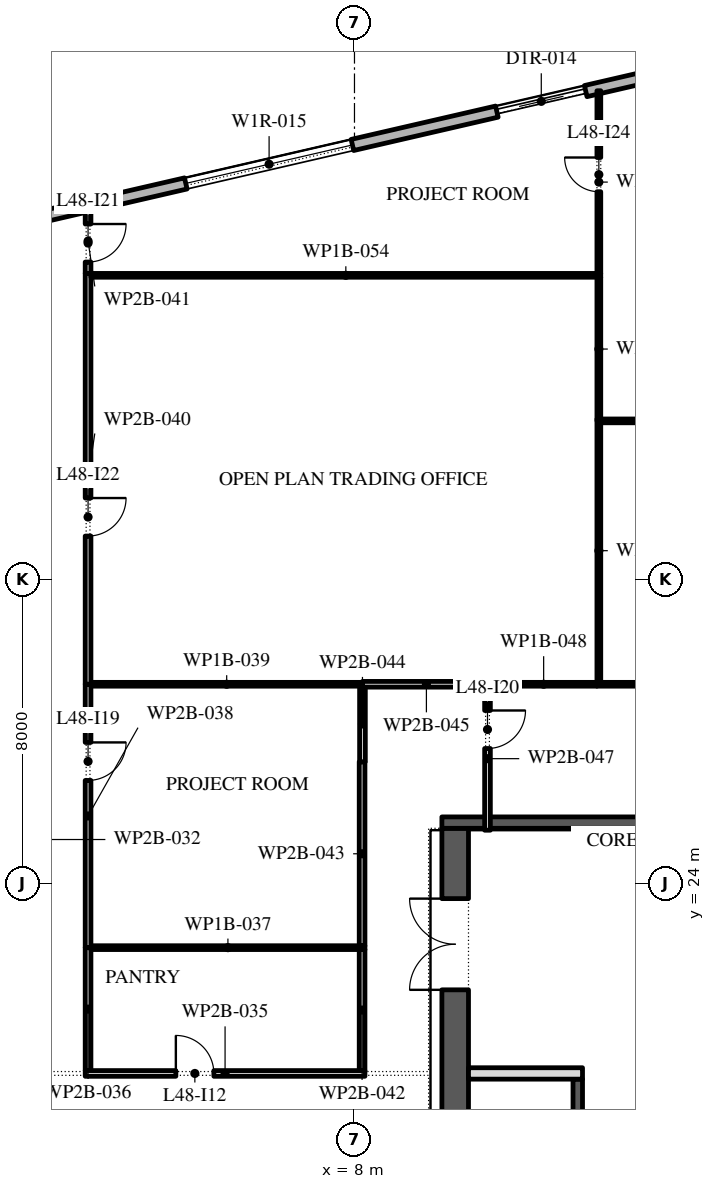
"""IFC4 building model, lengths in metres.
Left out: names, types, materials, properties, quantities, classifications, styles, units other than length and angle.
Written with IfcOpenShell. Run it as: python <this file> out.ifc"""

import sys

from ifc_helpers import new_model, si_unit, direction, frame, frame_2d, origin, place, context, subcontext, project, spatial, rectangle, extrude, element, fill, save


model = new_model("IFC4")
c1 = context("Model", 3, precision=1e-05, world=origin(), true_north=direction((0.0, 1.0)))
c2 = subcontext(c1, "Body", "Model", "MODEL_VIEW")
j1 = project(units=[si_unit("LENGTHUNIT", "METRE"), si_unit("PLANEANGLEUNIT", "RADIAN")], contexts=[c1])
p1 = place(None, origin())
s1 = spatial("IfcSite", under=j1, at=p1, CompositionType="ELEMENT")
p2 = place(p1, origin())
s2 = spatial("IfcBuilding", under=s1, at=p2, CompositionType="ELEMENT")
p3 = place(p2, frame((0.0, 0.0, 217.8)))
s3 = spatial("IfcBuildingStorey", under=s2, at=p3, CompositionType="ELEMENT", Elevation=217.8)
p4 = place(p3, frame((17.592, 45.657, 0.0), z_axis=(0.0, 0.0, 1.0), x_axis=(-0.974370243697, -0.224950279389, 0.0)))
e1 = element("IfcWall", 1, at=p4, inside=s3, PredefinedType="STANDARD", context=c2, shape_type="SweptSolid", body=[
    extrude(rectangle(XDim=49.5, YDim=0.3, at=frame_2d((24.75, 0.0))), origin(), (0.0, 0.0, 1.0), 3.95),
])
p5 = place(p4, frame((3.6, 0.0, 0.0)))
e2 = element("IfcOpeningElement", 2, at=p5, cuts=e1, PredefinedType="OPENING", context=c2, shape_type="SweptSolid", body=[
    extrude(rectangle(XDim=2.4, YDim=2.85, at=frame_2d((1.2, 1.425))), frame((0.0, 0.16, 0.0), z_axis=(0.0, -1.0, 0.0), x_axis=(1.0, 0.0, 0.0)), (0.0, 0.0, 1.0), 0.32),
])
p6 = place(p4, frame((9.9, 0.0, 0.45)))
e3 = element("IfcOpeningElement", 3, at=p6, cuts=e1, PredefinedType="OPENING", context=c2, shape_type="SweptSolid", body=[
    extrude(rectangle(XDim=4.5, YDim=2.4, at=frame_2d((2.25, 1.2))), frame((0.0, 0.16, 0.0), z_axis=(0.0, -1.0, 0.0), x_axis=(1.0, 0.0, 0.0)), (0.0, 0.0, 1.0), 0.32),
])
p7 = place(p4, frame((18.2, 0.0, 0.45)))
e4 = element("IfcOpeningElement", 4, at=p7, cuts=e1, PredefinedType="OPENING", context=c2, shape_type="SweptSolid", body=[
    extrude(rectangle(XDim=4.5, YDim=2.4, at=frame_2d((2.25, 1.2))), frame((0.0, 0.16, 0.0), z_axis=(0.0, -1.0, 0.0), x_axis=(1.0, 0.0, 0.0)), (0.0, 0.0, 1.0), 0.32),
])
p8 = place(p4, frame((26.5, 0.0, 0.45)))
e5 = element("IfcOpeningElement", 5, at=p8, cuts=e1, PredefinedType="OPENING", context=c2, shape_type="SweptSolid", body=[
    extrude(rectangle(XDim=4.5, YDim=2.4, at=frame_2d((2.25, 1.2))), frame((0.0, 0.16, 0.0), z_axis=(0.0, -1.0, 0.0), x_axis=(1.0, 0.0, 0.0)), (0.0, 0.0, 1.0), 0.32),
])
p9 = place(p4, frame((35.85, 0.0, 0.0)))
e6 = element("IfcOpeningElement", 6, at=p9, cuts=e1, PredefinedType="OPENING", context=c2, shape_type="SweptSolid", body=[
    extrude(rectangle(XDim=2.4, YDim=3.5, at=frame_2d((1.2, 1.75))), frame((0.0, 0.16, 0.0), z_axis=(0.0, -1.0, 0.0), x_axis=(1.0, 0.0, 0.0)), (0.0, 0.0, 1.0), 0.32),
])
p10 = place(p4, frame((43.1, 0.0, 0.45)))
e7 = element("IfcOpeningElement", 7, at=p10, cuts=e1, PredefinedType="OPENING", context=c2, shape_type="SweptSolid", body=[
    extrude(rectangle(XDim=4.5, YDim=2.525, at=frame_2d((2.25, 1.262))), frame((0.0, 0.16, 0.0), z_axis=(0.0, -1.0, 0.0), x_axis=(1.0, 0.0, 0.0)), (0.0, 0.0, 1.0), 0.32),
])
p11 = place(p3, frame((10.65, -2.45, 0.0), z_axis=(0.0, 0.0, 1.0), x_axis=(0.0, 1.0, 0.0)))
e8 = element("IfcWall", 8, at=p11, inside=s3, PredefinedType="SHEAR", context=c2, shape_type="SweptSolid", body=[
    extrude(rectangle(XDim=27.9, YDim=0.7, at=frame_2d((13.95, 0.0))), origin(), (0.0, 0.0, 1.0), 3.95),
])
p12 = place(p11, frame((23.65, 0.0, 0.0)))
e9 = element("IfcOpeningElement", 9, at=p12, cuts=e8, PredefinedType="OPENING", context=c2, shape_type="SweptSolid", body=[
    extrude(rectangle(XDim=2.4, YDim=2.1, at=frame_2d((1.2, 1.05))), frame((0.0, 0.36, 0.0), z_axis=(0.0, -1.0, 0.0), x_axis=(1.0, 0.0, 0.0)), (0.0, 0.0, 1.0), 0.72),
])
p13 = place(p11, frame((1.087, 0.0, 0.0)))
e10 = element("IfcOpeningElement", 10, at=p13, cuts=e8, PredefinedType="OPENING", context=c2, shape_type="SweptSolid", body=[
    extrude(rectangle(XDim=0.9, YDim=2.1, at=frame_2d((0.45, 1.05))), frame((0.0, 0.36, 0.0), z_axis=(0.0, -1.0, 0.0), x_axis=(1.0, 0.0, 0.0)), (0.0, 0.0, 1.0), 0.72),
])
p14 = place(p11, frame((4.262, 0.0, 0.0)))
e11 = element("IfcOpeningElement", 11, at=p14, cuts=e8, PredefinedType="OPENING", context=c2, shape_type="SweptSolid", body=[
    extrude(rectangle(XDim=1.0, YDim=2.1, at=frame_2d((0.5, 1.05))), frame((0.0, 0.36, 0.0), z_axis=(0.0, -1.0, 0.0), x_axis=(1.0, 0.0, 0.0)), (0.0, 0.0, 1.0), 0.72),
])
p15 = place(p3, frame((10.3, 25.6, 0.0), z_axis=(0.0, 0.0, 1.0), x_axis=(1.0, 0.0, 0.0)))
e12 = element("IfcWall", 12, at=p15, inside=s3, PredefinedType="SHEAR", context=c2, shape_type="SweptSolid", body=[
    extrude(rectangle(XDim=11.4, YDim=0.3, at=frame_2d((5.7, 0.0))), origin(), (0.0, 0.0, 1.0), 3.95),
])
p16 = place(p3, frame((13.875, -2.45, 0.0), z_axis=(0.0, 0.0, 1.0), x_axis=(0.0, 1.0, 0.0)))
e13 = element("IfcWall", 13, at=p16, inside=s3, PredefinedType="SHEAR", context=c2, shape_type="SweptSolid", body=[
    extrude(rectangle(XDim=21.3, YDim=0.25, at=frame_2d((10.65, 0.0))), origin(), (0.0, 0.0, 1.0), 3.95),
])
p17 = place(p16, frame((17.786, 0.0, 0.0)))
e14 = element("IfcOpeningElement", 14, at=p17, cuts=e13, PredefinedType="OPENING", context=c2, shape_type="SweptSolid", body=[
    extrude(rectangle(XDim=0.9, YDim=2.1, at=frame_2d((0.45, 1.05))), frame((0.0, 0.135, 0.0), z_axis=(0.0, -1.0, 0.0), x_axis=(1.0, 0.0, 0.0)), (0.0, 0.0, 1.0), 0.27),
])
p18 = place(p16, frame((6.971, 0.0, 0.0)))
e15 = element("IfcOpeningElement", 15, at=p18, cuts=e13, PredefinedType="OPENING", context=c2, shape_type="SweptSolid", body=[
    extrude(rectangle(XDim=1.1, YDim=2.1, at=frame_2d((0.55, 1.05))), frame((0.0, 0.135, 0.0), z_axis=(0.0, -1.0, 0.0), x_axis=(1.0, 0.0, 0.0)), (0.0, 0.0, 1.0), 0.27),
])
p19 = place(p16, frame((9.114, 0.0, 0.0)))
e16 = element("IfcOpeningElement", 16, at=p19, cuts=e13, PredefinedType="OPENING", context=c2, shape_type="SweptSolid", body=[
    extrude(rectangle(XDim=1.1, YDim=2.1, at=frame_2d((0.55, 1.05))), frame((0.0, 0.135, 0.0), z_axis=(0.0, -1.0, 0.0), x_axis=(1.0, 0.0, 0.0)), (0.0, 0.0, 1.0), 0.27),
])
p20 = place(p16, frame((11.257, 0.0, 0.0)))
e17 = element("IfcOpeningElement", 17, at=p20, cuts=e13, PredefinedType="OPENING", context=c2, shape_type="SweptSolid", body=[
    extrude(rectangle(XDim=1.1, YDim=2.1, at=frame_2d((0.55, 1.05))), frame((0.0, 0.135, 0.0), z_axis=(0.0, -1.0, 0.0), x_axis=(1.0, 0.0, 0.0)), (0.0, 0.0, 1.0), 0.27),
])
p21 = place(p16, frame((13.4, 0.0, 0.0)))
e18 = element("IfcOpeningElement", 18, at=p21, cuts=e13, PredefinedType="OPENING", context=c2, shape_type="SweptSolid", body=[
    extrude(rectangle(XDim=1.1, YDim=2.1, at=frame_2d((0.55, 1.05))), frame((0.0, 0.135, 0.0), z_axis=(0.0, -1.0, 0.0), x_axis=(1.0, 0.0, 0.0)), (0.0, 0.0, 1.0), 0.27),
])
p22 = place(p3, frame((11.0, 19.0, 0.0), z_axis=(0.0, 0.0, 1.0), x_axis=(1.0, 0.0, 0.0)))
e19 = element("IfcWall", 19, at=p22, inside=s3, PredefinedType="PARTITIONING", context=c2, shape_type="SweptSolid", body=[
    extrude(rectangle(XDim=3.0, YDim=0.3, at=frame_2d((1.5, 0.0))), origin(), (0.0, 0.0, 1.0), 3.95),
])
p23 = place(p3, frame((0.915, 19.0, 0.0), z_axis=(0.0, 0.0, 1.0), x_axis=(1.0, 0.0, 0.0)))
e20 = element("IfcWall", 20, at=p23, inside=s3, PredefinedType="PARTITIONING", context=c2, shape_type="SweptSolid", body=[
    extrude(rectangle(XDim=7.36, YDim=0.15, at=frame_2d((3.68, 0.0))), origin(), (0.0, 0.0, 1.0), 3.95),
])
p24 = place(p23, frame((2.385, 0.0, 0.0)))
e21 = element("IfcOpeningElement", 21, at=p24, cuts=e20, PredefinedType="OPENING", context=c2, shape_type="SweptSolid", body=[
    extrude(rectangle(XDim=1.0, YDim=2.1, at=frame_2d((0.5, 1.05))), frame((0.0, 0.085, 0.0), z_axis=(0.0, -1.0, 0.0), x_axis=(1.0, 0.0, 0.0)), (0.0, 0.0, 1.0), 0.17),
])
p25 = place(p3, frame((0.99, 22.31, 0.0), z_axis=(0.0, 0.0, 1.0), x_axis=(0.0, -1.0, 0.0)))
e22 = element("IfcWall", 22, at=p25, inside=s3, PredefinedType="PARTITIONING", context=c2, shape_type="SweptSolid", body=[
    extrude(rectangle(XDim=3.235, YDim=0.15, at=frame_2d((1.618, 0.0))), origin(), (0.0, 0.0, 1.0), 3.95),
])
p26 = place(p3, frame((1.065, 22.31, 0.0), z_axis=(0.0, 0.0, 1.0), x_axis=(1.0, 0.0, 0.0)))
e23 = element("IfcWall", 23, at=p26, inside=s3, PredefinedType="PARTITIONING", context=c2, shape_type="SweptSolid", body=[
    extrude(rectangle(XDim=7.21, YDim=0.1, at=frame_2d((3.605, 0.0))), origin(), (0.0, 0.0, 1.0), 3.95),
])
p27 = place(p3, frame((0.99, 29.24, 0.0), z_axis=(0.0, 0.0, 1.0), x_axis=(0.0, -1.0, 0.0)))
e24 = element("IfcWall", 24, at=p27, inside=s3, PredefinedType="PARTITIONING", context=c2, shape_type="SweptSolid", body=[
    extrude(rectangle(XDim=6.93, YDim=0.15, at=frame_2d((3.465, 0.0))), origin(), (0.0, 0.0, 1.0), 3.95),
])
p28 = place(p27, frame((1.53, 0.0, 0.0)))
e25 = element("IfcOpeningElement", 25, at=p28, cuts=e24, PredefinedType="OPENING", context=c2, shape_type="SweptSolid", body=[
    extrude(rectangle(XDim=1.0, YDim=2.1, at=frame_2d((0.5, 1.05))), frame((0.0, 0.085, 0.0), z_axis=(0.0, -1.0, 0.0), x_axis=(1.0, 0.0, 0.0)), (0.0, 0.0, 1.0), 0.17),
])
p29 = place(p3, frame((1.065, 29.24, 0.0), z_axis=(0.0, 0.0, 1.0), x_axis=(1.0, 0.0, 0.0)))
e26 = element("IfcWall", 26, at=p29, inside=s3, PredefinedType="PARTITIONING", context=c2, shape_type="SweptSolid", body=[
    extrude(rectangle(XDim=7.145, YDim=0.1, at=frame_2d((3.573, 0.0))), origin(), (0.0, 0.0, 1.0), 3.95),
])
p30 = place(p3, frame((0.99, 40.05, 0.0), z_axis=(0.0, 0.0, 1.0), x_axis=(0.0, -1.0, 0.0)))
e27 = element("IfcWall", 27, at=p30, inside=s3, PredefinedType="PARTITIONING", context=c2, shape_type="SweptSolid", body=[
    extrude(rectangle(XDim=10.81, YDim=0.15, at=frame_2d((5.405, 0.0))), origin(), (0.0, 0.0, 1.0), 3.95),
])
p31 = place(p30, frame((5.91, 0.0, 0.0)))
e28 = element("IfcOpeningElement", 28, at=p31, cuts=e27, PredefinedType="OPENING", context=c2, shape_type="SweptSolid", body=[
    extrude(rectangle(XDim=1.0, YDim=2.1, at=frame_2d((0.5, 1.05))), frame((0.0, 0.085, 0.0), z_axis=(0.0, -1.0, 0.0), x_axis=(1.0, 0.0, 0.0)), (0.0, 0.0, 1.0), 0.17),
])
p32 = place(p3, frame((0.99, 41.753, 0.0), z_axis=(0.0, 0.0, 1.0), x_axis=(0.0, -1.0, 0.0)))
e29 = element("IfcWall", 29, at=p32, inside=s3, PredefinedType="PARTITIONING", context=c2, shape_type="SweptSolid", body=[
    extrude(rectangle(XDim=1.703, YDim=0.15, at=frame_2d((0.852, 0.0))), origin(), (0.0, 0.0, 1.0), 3.95),
])
p33 = place(p32, frame((0.403, 0.0, 0.0)))
e30 = element("IfcOpeningElement", 30, at=p33, cuts=e29, PredefinedType="OPENING", context=c2, shape_type="SweptSolid", body=[
    extrude(rectangle(XDim=1.0, YDim=2.1, at=frame_2d((0.5, 1.05))), frame((0.0, 0.085, 0.0), z_axis=(0.0, -1.0, 0.0), x_axis=(1.0, 0.0, 0.0)), (0.0, 0.0, 1.0), 0.17),
])
p34 = place(p3, frame((8.2, 19.075, 0.0), z_axis=(0.0, 0.0, 1.0), x_axis=(0.0, 1.0, 0.0)))
e31 = element("IfcWall", 31, at=p34, inside=s3, PredefinedType="PARTITIONING", context=c2, shape_type="SweptSolid", body=[
    extrude(rectangle(XDim=3.185, YDim=0.15, at=frame_2d((1.593, 0.0))), origin(), (0.0, 0.0, 1.0), 3.95),
])
p35 = place(p3, frame((8.2, 22.36, 0.0), z_axis=(0.0, 0.0, 1.0), x_axis=(0.0, 1.0, 0.0)))
e32 = element("IfcWall", 32, at=p35, inside=s3, PredefinedType="PARTITIONING", context=c2, shape_type="SweptSolid", body=[
    extrude(rectangle(XDim=4.84, YDim=0.15, at=frame_2d((2.42, 0.0))), origin(), (0.0, 0.0, 1.0), 3.95),
])
p36 = place(p3, frame((8.21, 27.2, 0.0), z_axis=(0.0, 0.0, 1.0), x_axis=(0.0, 1.0, 0.0)))
e33 = element("IfcWall", 33, at=p36, inside=s3, PredefinedType="PARTITIONING", context=c2, shape_type="SweptSolid", body=[
    extrude(rectangle(XDim=1.99, YDim=0.15, at=frame_2d((0.995, 0.0))), origin(), (0.0, 0.0, 1.0), 3.95),
])
p37 = place(p3, frame((8.21, 29.24, 0.0), z_axis=(0.0, 0.0, 1.0), x_axis=(1.0, 0.0, 0.0)))
e34 = element("IfcWall", 34, at=p37, inside=s3, PredefinedType="PARTITIONING", context=c2, shape_type="SweptSolid", body=[
    extrude(rectangle(XDim=3.365, YDim=0.15, at=frame_2d((1.683, 0.0))), origin(), (0.0, 0.0, 1.0), 3.95),
])
p38 = place(p3, frame((11.5, 29.165, 0.0), z_axis=(0.0, 0.0, 1.0), x_axis=(0.0, -1.0, 0.0)))
e35 = element("IfcWall", 35, at=p38, inside=s3, PredefinedType="PARTITIONING", context=c2, shape_type="SweptSolid", body=[
    extrude(rectangle(XDim=3.765, YDim=0.15, at=frame_2d((1.883, 0.0))), origin(), (0.0, 0.0, 1.0), 3.95),
])
p39 = place(p38, frame((0.615, 0.0, 0.0)))
e36 = element("IfcOpeningElement", 36, at=p39, cuts=e35, PredefinedType="OPENING", context=c2, shape_type="SweptSolid", body=[
    extrude(rectangle(XDim=1.0, YDim=2.1, at=frame_2d((0.5, 1.05))), frame((0.0, 0.085, 0.0), z_axis=(0.0, -1.0, 0.0), x_axis=(1.0, 0.0, 0.0)), (0.0, 0.0, 1.0), 0.17),
])
p40 = place(p3, frame((11.575, 29.24, 0.0), z_axis=(0.0, 0.0, 1.0), x_axis=(1.0, 0.0, 0.0)))
e37 = element("IfcWall", 37, at=p40, inside=s3, PredefinedType="PARTITIONING", context=c2, shape_type="SweptSolid", body=[
    extrude(rectangle(XDim=2.805, YDim=0.1, at=frame_2d((1.402, 0.0))), origin(), (0.0, 0.0, 1.0), 3.95),
])
p41 = place(p3, frame((14.38, 29.24, 0.0), z_axis=(0.0, 0.0, 1.0), x_axis=(1.0, 0.0, 0.0)))
e38 = element("IfcWall", 38, at=p41, inside=s3, PredefinedType="PARTITIONING", context=c2, shape_type="SweptSolid", body=[
    extrude(rectangle(XDim=7.63, YDim=0.1, at=frame_2d((3.815, 0.0))), origin(), (0.0, 0.0, 1.0), 3.95),
])
p42 = place(p41, frame((3.28, 0.0, 0.0)))
e39 = element("IfcOpeningElement", 39, at=p42, cuts=e38, PredefinedType="OPENING", context=c2, shape_type="SweptSolid", body=[
    extrude(rectangle(XDim=0.9, YDim=2.1, at=frame_2d((0.45, 1.05))), frame((0.0, 0.06, 0.0), z_axis=(0.0, -1.0, 0.0), x_axis=(1.0, 0.0, 0.0)), (0.0, 0.0, 1.0), 0.12),
])
p43 = place(p3, frame((14.43, 36.22, 0.0), z_axis=(0.0, 0.0, 1.0), x_axis=(0.0, -1.0, 0.0)))
e40 = element("IfcWall", 40, at=p43, inside=s3, PredefinedType="PARTITIONING", context=c2, shape_type="SweptSolid", body=[
    extrude(rectangle(XDim=6.93, YDim=0.1, at=frame_2d((3.465, 0.0))), origin(), (0.0, 0.0, 1.0), 3.95),
])
p44 = place(p3, frame((14.48, 36.17, 0.0), z_axis=(0.0, 0.0, 1.0), x_axis=(1.0, 0.0, 0.0)))
e41 = element("IfcWall", 41, at=p44, inside=s3, PredefinedType="PARTITIONING", context=c2, shape_type="SweptSolid", body=[
    extrude(rectangle(XDim=9.08, YDim=0.1, at=frame_2d((4.54, 0.0))), origin(), (0.0, 0.0, 1.0), 3.95),
])
p45 = place(p3, frame((14.48, 40.0, 0.0), z_axis=(0.0, 0.0, 1.0), x_axis=(-1.0, 0.0, 0.0)))
e42 = element("IfcWall", 42, at=p45, inside=s3, PredefinedType="PARTITIONING", context=c2, shape_type="SweptSolid", body=[
    extrude(rectangle(XDim=13.415, YDim=0.1, at=frame_2d((6.708, 0.0))), origin(), (0.0, 0.0, 1.0), 3.95),
])
p46 = place(p3, frame((14.43, 39.95, 0.0), z_axis=(0.0, 0.0, 1.0), x_axis=(0.0, -1.0, 0.0)))
e43 = element("IfcWall", 43, at=p46, inside=s3, PredefinedType="PARTITIONING", context=c2, shape_type="SweptSolid", body=[
    extrude(rectangle(XDim=3.78, YDim=0.1, at=frame_2d((1.89, 0.0))), origin(), (0.0, 0.0, 1.0), 3.95),
])
p47 = place(p3, frame((14.43, 44.856, 0.0), z_axis=(0.0, 0.0, 1.0), x_axis=(0.0, -1.0, 0.0)))
e44 = element("IfcWall", 44, at=p47, inside=s3, PredefinedType="PARTITIONING", context=c2, shape_type="SweptSolid", body=[
    extrude(rectangle(XDim=4.806, YDim=0.1, at=frame_2d((2.403, 0.0))), origin(), (0.0, 0.0, 1.0), 3.95),
])
p48 = place(p47, frame((1.756, 0.0, 0.0)))
e45 = element("IfcOpeningElement", 45, at=p48, cuts=e44, PredefinedType="OPENING", context=c2, shape_type="SweptSolid", body=[
    extrude(rectangle(XDim=0.9, YDim=2.1, at=frame_2d((0.45, 1.05))), frame((0.0, 0.06, 0.0), z_axis=(0.0, -1.0, 0.0), x_axis=(1.0, 0.0, 0.0)), (0.0, 0.0, 1.0), 0.12),
])
p49 = place(p5, origin())
e46 = element("IfcDoor", 46, at=p49, inside=s3, OperationType="DOUBLE_DOOR_SLIDING", PredefinedType="DOOR", context=c2, shape_type="SweptSolid", body=[
    extrude(rectangle(XDim=2.4, YDim=2.85, at=frame_2d((1.2, 1.425))), frame((0.0, 0.025, 0.0), z_axis=(0.0, -1.0, 0.0), x_axis=(1.0, 0.0, 0.0)), (0.0, 0.0, 1.0), 0.05),
])
fill(e2, e46)
p50 = place(p6, origin())
e47 = element("IfcWindow", 47, at=p50, inside=s3, PartitioningType="DOUBLE_PANEL_VERTICAL", PredefinedType="WINDOW", context=c2, shape_type="SweptSolid", body=[
    extrude(rectangle(XDim=4.5, YDim=2.4, at=frame_2d((2.25, 1.2))), frame((0.0, 0.03, 0.0), z_axis=(0.0, -1.0, 0.0), x_axis=(1.0, 0.0, 0.0)), (0.0, 0.0, 1.0), 0.06),
])
fill(e3, e47)
p51 = place(p12, origin())
e48 = element("IfcDoor", 48, at=p51, inside=s3, OperationType="DOUBLE_DOOR_SINGLE_SWING", PredefinedType="DOOR", context=c2, shape_type="SweptSolid", body=[
    extrude(rectangle(XDim=2.4, YDim=2.1, at=frame_2d((1.2, 1.05))), frame((0.0, 0.025, 0.0), z_axis=(0.0, -1.0, 0.0), x_axis=(1.0, 0.0, 0.0)), (0.0, 0.0, 1.0), 0.05),
])
fill(e9, e48)
p52 = place(p24, origin())
e49 = element("IfcDoor", 49, at=p52, inside=s3, OperationType="SINGLE_SWING_RIGHT", PredefinedType="DOOR", context=c2, shape_type="SweptSolid", body=[
    extrude(rectangle(XDim=1.0, YDim=2.1, at=frame_2d((0.5, 1.05))), frame((0.0, 0.025, 0.0), z_axis=(0.0, -1.0, 0.0), x_axis=(1.0, 0.0, 0.0)), (0.0, 0.0, 1.0), 0.05),
])
fill(e21, e49)
p53 = place(p28, origin())
e50 = element("IfcDoor", 50, at=p53, inside=s3, OperationType="SINGLE_SWING_RIGHT", PredefinedType="DOOR", context=c2, shape_type="SweptSolid", body=[
    extrude(rectangle(XDim=1.0, YDim=2.1, at=frame_2d((0.5, 1.05))), frame((0.0, 0.025, 0.0), z_axis=(0.0, -1.0, 0.0), x_axis=(1.0, 0.0, 0.0)), (0.0, 0.0, 1.0), 0.05),
])
fill(e25, e50)
p54 = place(p39, origin())
e51 = element("IfcDoor", 51, at=p54, inside=s3, OperationType="SINGLE_SWING_RIGHT", PredefinedType="DOOR", context=c2, shape_type="SweptSolid", body=[
    extrude(rectangle(XDim=1.0, YDim=2.1, at=frame_2d((0.5, 1.05))), frame((0.0, 0.025, 0.0), z_axis=(0.0, -1.0, 0.0), x_axis=(1.0, 0.0, 0.0)), (0.0, 0.0, 1.0), 0.05),
])
fill(e36, e51)
p55 = place(p33, origin())
e52 = element("IfcDoor", 52, at=p55, inside=s3, OperationType="SINGLE_SWING_RIGHT", PredefinedType="DOOR", context=c2, shape_type="SweptSolid", body=[
    extrude(rectangle(XDim=1.0, YDim=2.1, at=frame_2d((0.5, 1.05))), frame((0.0, 0.025, 0.0), z_axis=(0.0, -1.0, 0.0), x_axis=(1.0, 0.0, 0.0)), (0.0, 0.0, 1.0), 0.05),
])
fill(e30, e52)
p56 = place(p31, origin())
e53 = element("IfcDoor", 53, at=p56, inside=s3, OperationType="SINGLE_SWING_RIGHT", PredefinedType="DOOR", context=c2, shape_type="SweptSolid", body=[
    extrude(rectangle(XDim=1.0, YDim=2.1, at=frame_2d((0.5, 1.05))), frame((0.0, 0.025, 0.0), z_axis=(0.0, -1.0, 0.0), x_axis=(1.0, 0.0, 0.0)), (0.0, 0.0, 1.0), 0.05),
])
fill(e28, e53)
p57 = place(p48, frame((0.9, 0.0, 0.0), z_axis=(0.0, 0.0, 1.0), x_axis=(-1.0, 0.0, 0.0)))
e54 = element("IfcDoor", 54, at=p57, inside=s3, OperationType="SINGLE_SWING_LEFT", PredefinedType="DOOR", context=c2, shape_type="SweptSolid", body=[
    extrude(rectangle(XDim=0.9, YDim=2.1, at=frame_2d((0.45, 1.05))), frame((0.0, 0.025, 0.0), z_axis=(0.0, -1.0, 0.0), x_axis=(1.0, 0.0, 0.0)), (0.0, 0.0, 1.0), 0.05),
])
fill(e45, e54)
save(model, sys.argv[1])
